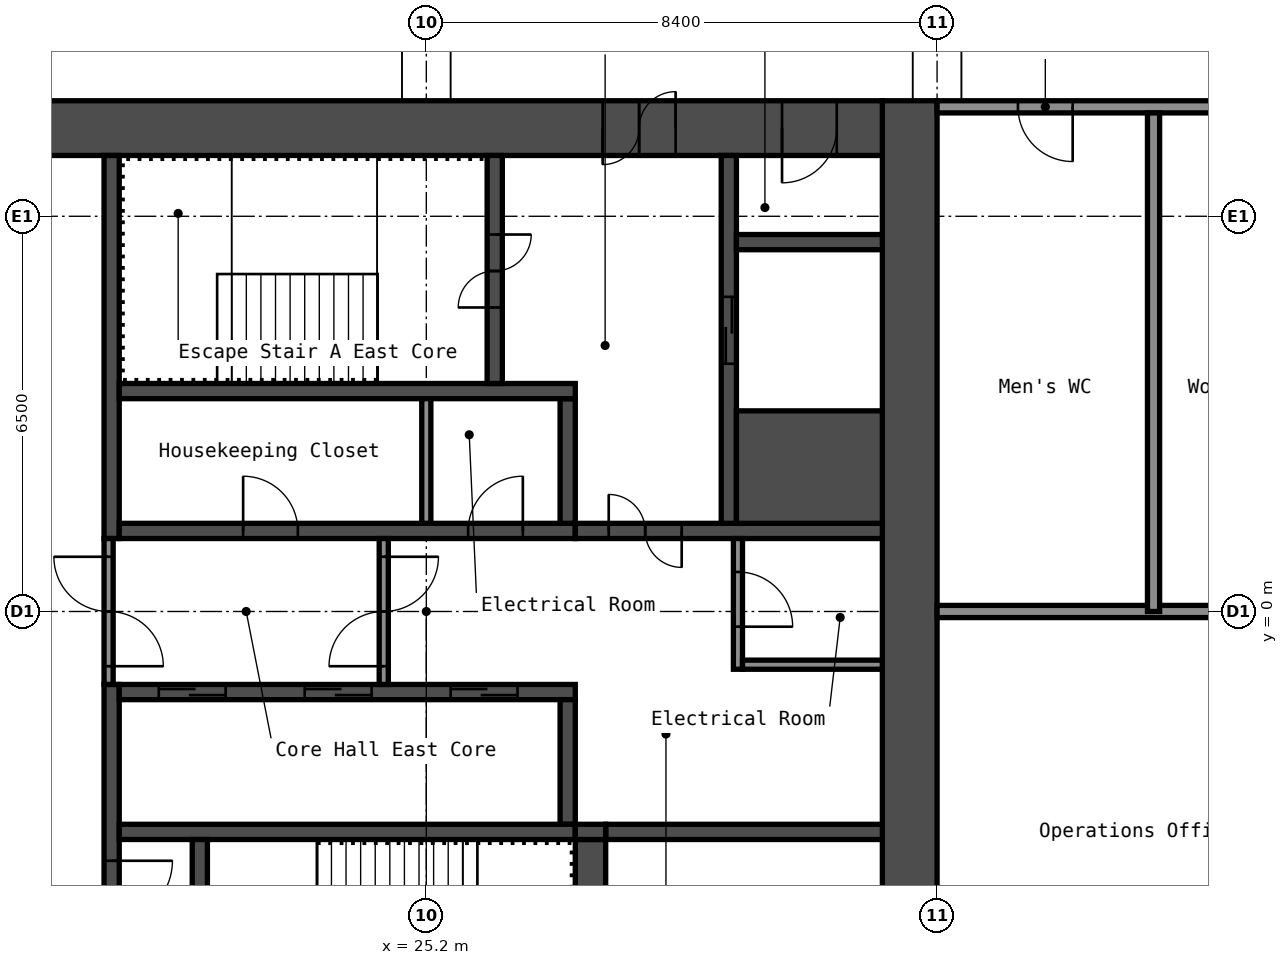
"""IFC4 building model, lengths in metres.
Left out: names, types, materials, properties, quantities, classifications, styles, units other than length and angle.
Written with IfcOpenShell. Run it as: python <this file> out.ifc"""

import sys

from ifc_helpers import new_model, si_unit, direction, frame, frame_2d, origin, place, context, subcontext, project, spatial, rectangle, extrude, element, fill, save


model = new_model("IFC4")
c1 = context("Model", 3, precision=1e-05, world=origin(), true_north=direction((0.0, 1.0)))
c2 = subcontext(c1, "Body", "Model", "MODEL_VIEW")
j1 = project(units=[si_unit("LENGTHUNIT", "METRE"), si_unit("PLANEANGLEUNIT", "RADIAN")], contexts=[c1])
p1 = place(None, origin())
s1 = spatial("IfcSite", under=j1, at=p1, CompositionType="ELEMENT")
p2 = place(p1, origin())
s2 = spatial("IfcBuilding", under=s1, at=p2, CompositionType="ELEMENT")
p3 = place(p2, frame((0.0, 0.0, 175.8)))
s3 = spatial("IfcBuildingStorey", under=s2, at=p3, CompositionType="ELEMENT", Elevation=175.8)
p4 = place(p3, frame((33.15, -8.4, 0.0), z_axis=(0.0, 0.0, 1.0), x_axis=(0.0, 1.0, 0.0)))
e1 = element("IfcWall", 1, at=p4, inside=s3, PredefinedType="SHEAR", context=c2, shape_type="SweptSolid", body=[
    extrude(rectangle(XDim=16.8, YDim=0.9, at=frame_2d((8.4, 0.0))), origin(), (0.0, 0.0, 1.0), 4.1),
])
p5 = place(p3, frame((17.7, 7.95, 0.0), z_axis=(0.0, 0.0, 1.0), x_axis=(1.0, 0.0, 0.0)))
e2 = element("IfcWall", 2, at=p5, inside=s3, PredefinedType="SHEAR", context=c2, shape_type="SweptSolid", body=[
    extrude(rectangle(XDim=15.0, YDim=0.9, at=frame_2d((7.5, 0.0))), origin(), (0.0, 0.0, 1.0), 4.1),
])
p6 = place(p5, frame((10.4, 0.0, 0.0)))
e3 = element("IfcOpeningElement", 3, at=p6, cuts=e2, PredefinedType="OPENING", context=c2, shape_type="SweptSolid", body=[
    extrude(rectangle(XDim=1.2, YDim=2.1, at=frame_2d((0.6, 1.05))), frame((0.0, 0.46, 0.0), z_axis=(0.0, -1.0, 0.0), x_axis=(1.0, 0.0, 0.0)), (0.0, 0.0, 1.0), 0.92),
])
p7 = place(p5, frame((13.35, 0.0, 0.0)))
e4 = element("IfcOpeningElement", 4, at=p7, cuts=e2, PredefinedType="OPENING", context=c2, shape_type="SweptSolid", body=[
    extrude(rectangle(XDim=0.9, YDim=2.1, at=frame_2d((0.45, 1.05))), frame((0.0, 0.46, 0.0), z_axis=(0.0, -1.0, 0.0), x_axis=(1.0, 0.0, 0.0)), (0.0, 0.0, 1.0), 0.92),
])
p8 = place(p3, frame((20.025, 1.2, 0.0), z_axis=(0.0, 0.0, 1.0), x_axis=(0.0, 1.0, 0.0)))
e5 = element("IfcWall", 5, at=p8, inside=s3, PredefinedType="SHEAR", context=c2, shape_type="SweptSolid", body=[
    extrude(rectangle(XDim=6.3, YDim=0.25, at=frame_2d((3.15, 0.0))), origin(), (0.0, 0.0, 1.0), 4.1),
])
p9 = place(p3, frame((20.025, -7.5, 0.0), z_axis=(0.0, 0.0, 1.0), x_axis=(0.0, 1.0, 0.0)))
e6 = element("IfcWall", 6, at=p9, inside=s3, PredefinedType="SHEAR", context=c2, shape_type="SweptSolid", body=[
    extrude(rectangle(XDim=6.3, YDim=0.25, at=frame_2d((3.15, 0.0))), origin(), (0.0, 0.0, 1.0), 4.1),
])
p10 = place(p9, frame((2.4, 0.0, 0.0)))
e7 = element("IfcOpeningElement", 7, at=p10, cuts=e6, PredefinedType="OPENING", context=c2, shape_type="SweptSolid", body=[
    extrude(rectangle(XDim=1.0, YDim=2.1, at=frame_2d((0.5, 1.05))), frame((0.0, 0.135, 0.0), z_axis=(0.0, -1.0, 0.0), x_axis=(1.0, 0.0, 0.0)), (0.0, 0.0, 1.0), 0.27),
])
p11 = place(p3, frame((20.15, 1.325, 0.0), z_axis=(0.0, 0.0, 1.0), x_axis=(1.0, 0.0, 0.0)))
e8 = element("IfcWall", 8, at=p11, inside=s3, PredefinedType="SHEAR", context=c2, shape_type="SweptSolid", body=[
    extrude(rectangle(XDim=7.5, YDim=0.25, at=frame_2d((3.75, 0.0))), origin(), (0.0, 0.0, 1.0), 4.1),
])
p12 = place(p11, frame((2.038, 0.0, 0.0)))
e9 = element("IfcOpeningElement", 9, at=p12, cuts=e8, PredefinedType="OPENING", context=c2, shape_type="SweptSolid", body=[
    extrude(rectangle(XDim=0.9, YDim=2.1, at=frame_2d((0.45, 1.05))), frame((0.0, 0.135, 0.0), z_axis=(0.0, -1.0, 0.0), x_axis=(1.0, 0.0, 0.0)), (0.0, 0.0, 1.0), 0.27),
])
p13 = place(p11, frame((5.738, 0.0, 0.0)))
e10 = element("IfcOpeningElement", 10, at=p13, cuts=e8, PredefinedType="OPENING", context=c2, shape_type="SweptSolid", body=[
    extrude(rectangle(XDim=0.9, YDim=2.1, at=frame_2d((0.45, 1.05))), frame((0.0, 0.135, 0.0), z_axis=(0.0, -1.0, 0.0), x_axis=(1.0, 0.0, 0.0)), (0.0, 0.0, 1.0), 0.27),
])
p14 = place(p3, frame((27.525, 1.45, 0.0), z_axis=(0.0, 0.0, 1.0), x_axis=(0.0, 1.0, 0.0)))
e11 = element("IfcWall", 11, at=p14, inside=s3, PredefinedType="SHEAR", context=c2, shape_type="SweptSolid", body=[
    extrude(rectangle(XDim=2.05, YDim=0.25, at=frame_2d((1.025, 0.0))), origin(), (0.0, 0.0, 1.0), 4.1),
])
p15 = place(p3, frame((20.15, 3.625, 0.0), z_axis=(0.0, 0.0, 1.0), x_axis=(1.0, 0.0, 0.0)))
e12 = element("IfcWall", 12, at=p15, inside=s3, PredefinedType="SHEAR", context=c2, shape_type="SweptSolid", body=[
    extrude(rectangle(XDim=7.5, YDim=0.25, at=frame_2d((3.75, 0.0))), origin(), (0.0, 0.0, 1.0), 4.1),
])
p16 = place(p3, frame((26.325, 3.75, 0.0), z_axis=(0.0, 0.0, 1.0), x_axis=(0.0, 1.0, 0.0)))
e13 = element("IfcWall", 13, at=p16, inside=s3, PredefinedType="SHEAR", context=c2, shape_type="SweptSolid", body=[
    extrude(rectangle(XDim=3.75, YDim=0.25, at=frame_2d((1.875, 0.0))), origin(), (0.0, 0.0, 1.0), 4.1),
])
p17 = place(p16, frame((1.25, 0.0, 0.0)))
e14 = element("IfcOpeningElement", 14, at=p17, cuts=e13, PredefinedType="OPENING", context=c2, shape_type="SweptSolid", body=[
    extrude(rectangle(XDim=1.2, YDim=2.1, at=frame_2d((0.6, 1.05))), frame((0.0, 0.135, 0.0), z_axis=(0.0, -1.0, 0.0), x_axis=(1.0, 0.0, 0.0)), (0.0, 0.0, 1.0), 0.27),
])
p18 = place(p3, frame((27.65, 1.325, 0.0), z_axis=(0.0, 0.0, 1.0), x_axis=(1.0, 0.0, 0.0)))
e15 = element("IfcWall", 15, at=p18, inside=s3, PredefinedType="SHEAR", context=c2, shape_type="SweptSolid", body=[
    extrude(rectangle(XDim=5.05, YDim=0.25, at=frame_2d((2.525, 0.0))), origin(), (0.0, 0.0, 1.0), 4.1),
])
p19 = place(p18, frame((0.55, 0.0, 0.0)))
e16 = element("IfcOpeningElement", 16, at=p19, cuts=e15, PredefinedType="OPENING", context=c2, shape_type="SweptSolid", body=[
    extrude(rectangle(XDim=1.2, YDim=2.1, at=frame_2d((0.6, 1.05))), frame((0.0, 0.135, 0.0), z_axis=(0.0, -1.0, 0.0), x_axis=(1.0, 0.0, 0.0)), (0.0, 0.0, 1.0), 0.27),
])
p20 = place(p3, frame((30.175, 1.45, 0.0), z_axis=(0.0, 0.0, 1.0), x_axis=(0.0, 1.0, 0.0)))
e17 = element("IfcWall", 17, at=p20, inside=s3, PredefinedType="SHEAR", context=c2, shape_type="SweptSolid", body=[
    extrude(rectangle(XDim=6.05, YDim=0.25, at=frame_2d((3.025, 0.0))), origin(), (0.0, 0.0, 1.0), 4.1),
])
p21 = place(p20, frame((2.625, 0.0, 0.0)))
e18 = element("IfcOpeningElement", 18, at=p21, cuts=e17, PredefinedType="OPENING", context=c2, shape_type="SweptSolid", body=[
    extrude(rectangle(XDim=1.1, YDim=2.1, at=frame_2d((0.55, 1.05))), frame((0.0, 0.135, 0.0), z_axis=(0.0, -1.0, 0.0), x_axis=(1.0, 0.0, 0.0)), (0.0, 0.0, 1.0), 0.27),
])
p22 = place(p3, frame((30.3, 2.375, 0.0), z_axis=(0.0, 0.0, 1.0), x_axis=(1.0, 0.0, 0.0)))
e19 = element("IfcWall", 19, at=p22, inside=s3, PredefinedType="SHEAR", context=c2, shape_type="SweptSolid", body=[
    extrude(rectangle(XDim=2.4, YDim=1.85, at=frame_2d((1.2, 0.0))), origin(), (0.0, 0.0, 1.0), 4.1),
])
p23 = place(p3, frame((30.3, 6.075, 0.0), z_axis=(0.0, 0.0, 1.0), x_axis=(1.0, 0.0, 0.0)))
e20 = element("IfcWall", 20, at=p23, inside=s3, PredefinedType="SHEAR", context=c2, shape_type="SweptSolid", body=[
    extrude(rectangle(XDim=2.4, YDim=0.25, at=frame_2d((1.2, 0.0))), origin(), (0.0, 0.0, 1.0), 4.1),
])
p24 = place(p3, frame((20.15, -1.325, 0.0), z_axis=(0.0, 0.0, 1.0), x_axis=(1.0, 0.0, 0.0)))
e21 = element("IfcWall", 21, at=p24, inside=s3, PredefinedType="SHEAR", context=c2, shape_type="SweptSolid", body=[
    extrude(rectangle(XDim=7.5, YDim=0.25, at=frame_2d((3.75, 0.0))), origin(), (0.0, 0.0, 1.0), 4.1),
])
p25 = place(p24, frame((0.65, 0.0, 0.0)))
e22 = element("IfcOpeningElement", 22, at=p25, cuts=e21, PredefinedType="OPENING", context=c2, shape_type="SweptSolid", body=[
    extrude(rectangle(XDim=1.1, YDim=2.1, at=frame_2d((0.55, 1.05))), frame((0.0, 0.135, 0.0), z_axis=(0.0, -1.0, 0.0), x_axis=(1.0, 0.0, 0.0)), (0.0, 0.0, 1.0), 0.27),
])
p26 = place(p24, frame((3.05, 0.0, 0.0)))
e23 = element("IfcOpeningElement", 23, at=p26, cuts=e21, PredefinedType="OPENING", context=c2, shape_type="SweptSolid", body=[
    extrude(rectangle(XDim=1.1, YDim=2.1, at=frame_2d((0.55, 1.05))), frame((0.0, 0.135, 0.0), z_axis=(0.0, -1.0, 0.0), x_axis=(1.0, 0.0, 0.0)), (0.0, 0.0, 1.0), 0.27),
])
p27 = place(p24, frame((5.45, 0.0, 0.0)))
e24 = element("IfcOpeningElement", 24, at=p27, cuts=e21, PredefinedType="OPENING", context=c2, shape_type="SweptSolid", body=[
    extrude(rectangle(XDim=1.1, YDim=2.1, at=frame_2d((0.55, 1.05))), frame((0.0, 0.135, 0.0), z_axis=(0.0, -1.0, 0.0), x_axis=(1.0, 0.0, 0.0)), (0.0, 0.0, 1.0), 0.27),
])
p28 = place(p3, frame((27.525, -3.5, 0.0), z_axis=(0.0, 0.0, 1.0), x_axis=(0.0, 1.0, 0.0)))
e25 = element("IfcWall", 25, at=p28, inside=s3, PredefinedType="SHEAR", context=c2, shape_type="SweptSolid", body=[
    extrude(rectangle(XDim=2.05, YDim=0.25, at=frame_2d((1.025, 0.0))), origin(), (0.0, 0.0, 1.0), 4.1),
])
p29 = place(p3, frame((20.15, -3.625, 0.0), z_axis=(0.0, 0.0, 1.0), x_axis=(1.0, 0.0, 0.0)))
e26 = element("IfcWall", 26, at=p29, inside=s3, PredefinedType="SHEAR", context=c2, shape_type="SweptSolid", body=[
    extrude(rectangle(XDim=7.5, YDim=0.25, at=frame_2d((3.75, 0.0))), origin(), (0.0, 0.0, 1.0), 4.1),
])
p30 = place(p3, frame((21.475, -7.5, 0.0), z_axis=(0.0, 0.0, 1.0), x_axis=(0.0, 1.0, 0.0)))
e27 = element("IfcWall", 27, at=p30, inside=s3, PredefinedType="SHEAR", context=c2, shape_type="SweptSolid", body=[
    extrude(rectangle(XDim=3.75, YDim=0.25, at=frame_2d((1.875, 0.0))), origin(), (0.0, 0.0, 1.0), 4.1),
])
p31 = place(p30, frame((1.3, 0.0, 0.0)))
e28 = element("IfcOpeningElement", 28, at=p31, cuts=e27, PredefinedType="OPENING", context=c2, shape_type="SweptSolid", body=[
    extrude(rectangle(XDim=1.2, YDim=2.1, at=frame_2d((0.6, 1.05))), frame((0.0, 0.135, 0.0), z_axis=(0.0, -1.0, 0.0), x_axis=(1.0, 0.0, 0.0)), (0.0, 0.0, 1.0), 0.27),
])
p32 = place(p3, frame((27.9, -7.5, 0.0), z_axis=(0.0, 0.0, 1.0), x_axis=(0.0, 1.0, 0.0)))
e29 = element("IfcWall", 29, at=p32, inside=s3, PredefinedType="SHEAR", context=c2, shape_type="SweptSolid", body=[
    extrude(rectangle(XDim=3.75, YDim=0.5, at=frame_2d((1.875, 0.0))), origin(), (0.0, 0.0, 1.0), 4.1),
])
p33 = place(p3, frame((28.15, -3.625, 0.0), z_axis=(0.0, 0.0, 1.0), x_axis=(1.0, 0.0, 0.0)))
e30 = element("IfcWall", 30, at=p33, inside=s3, PredefinedType="SHEAR", context=c2, shape_type="SweptSolid", body=[
    extrude(rectangle(XDim=4.55, YDim=0.25, at=frame_2d((2.275, 0.0))), origin(), (0.0, 0.0, 1.0), 4.1),
])
p34 = place(p3, frame((27.65, -3.625, 0.0), z_axis=(0.0, 0.0, 1.0), x_axis=(1.0, 0.0, 0.0)))
e31 = element("IfcWall", 31, at=p34, inside=s3, PredefinedType="SHEAR", context=c2, shape_type="SweptSolid", body=[
    extrude(rectangle(XDim=0.5, YDim=0.25, at=frame_2d((0.25, 0.0))), origin(), (0.0, 0.0, 1.0), 4.1),
])
p35 = place(p3, frame((19.975, -1.2, 0.0), z_axis=(0.0, 0.0, 1.0), x_axis=(0.0, 1.0, 0.0)))
e32 = element("IfcWall", 32, at=p35, inside=s3, PredefinedType="PARTITIONING", context=c2, shape_type="SweptSolid", body=[
    extrude(rectangle(XDim=2.4, YDim=0.15, at=frame_2d((1.2, 0.0))), origin(), (0.0, 0.0, 1.0), 4.1),
])
p36 = place(p35, frame((0.3, 0.0, 0.0)))
e33 = element("IfcOpeningElement", 33, at=p36, cuts=e32, PredefinedType="OPENING", context=c2, shape_type="SweptSolid", body=[
    extrude(rectangle(XDim=1.8, YDim=2.1, at=frame_2d((0.9, 1.05))), frame((0.0, 0.085, 0.0), z_axis=(0.0, -1.0, 0.0), x_axis=(1.0, 0.0, 0.0)), (0.0, 0.0, 1.0), 0.17),
])
p37 = place(p3, frame((24.5, -1.2, 0.0), z_axis=(0.0, 0.0, 1.0), x_axis=(0.0, 1.0, 0.0)))
e34 = element("IfcWall", 34, at=p37, inside=s3, PredefinedType="PARTITIONING", context=c2, shape_type="SweptSolid", body=[
    extrude(rectangle(XDim=2.4, YDim=0.15, at=frame_2d((1.2, 0.0))), origin(), (0.0, 0.0, 1.0), 4.1),
])
p38 = place(p37, frame((0.3, 0.0, 0.0)))
e35 = element("IfcOpeningElement", 35, at=p38, cuts=e34, PredefinedType="OPENING", context=c2, shape_type="SweptSolid", body=[
    extrude(rectangle(XDim=1.8, YDim=2.1, at=frame_2d((0.9, 1.05))), frame((0.0, 0.085, 0.0), z_axis=(0.0, -1.0, 0.0), x_axis=(1.0, 0.0, 0.0)), (0.0, 0.0, 1.0), 0.17),
])
p39 = place(p3, frame((30.325, -0.95, 0.0), z_axis=(0.0, 0.0, 1.0), x_axis=(0.0, 1.0, 0.0)))
e36 = element("IfcWall", 36, at=p39, inside=s3, PredefinedType="PARTITIONING", context=c2, shape_type="SweptSolid", body=[
    extrude(rectangle(XDim=2.15, YDim=0.15, at=frame_2d((1.075, 0.0))), origin(), (0.0, 0.0, 1.0), 4.1),
])
p40 = place(p39, frame((0.7, 0.0, 0.0)))
e37 = element("IfcOpeningElement", 37, at=p40, cuts=e36, PredefinedType="OPENING", context=c2, shape_type="SweptSolid", body=[
    extrude(rectangle(XDim=0.9, YDim=2.1, at=frame_2d((0.45, 1.05))), frame((0.0, 0.085, 0.0), z_axis=(0.0, -1.0, 0.0), x_axis=(1.0, 0.0, 0.0)), (0.0, 0.0, 1.0), 0.17),
])
p41 = place(p3, frame((30.4, -0.875, 0.0), z_axis=(0.0, 0.0, 1.0), x_axis=(1.0, 0.0, 0.0)))
e38 = element("IfcWall", 38, at=p41, inside=s3, PredefinedType="PARTITIONING", context=c2, shape_type="SweptSolid", body=[
    extrude(rectangle(XDim=2.3, YDim=0.15, at=frame_2d((1.15, 0.0))), origin(), (0.0, 0.0, 1.0), 4.1),
])
p42 = place(p3, frame((25.2, 1.45, 0.0), z_axis=(0.0, 0.0, 1.0), x_axis=(0.0, 1.0, 0.0)))
e39 = element("IfcWall", 39, at=p42, inside=s3, PredefinedType="PARTITIONING", context=c2, shape_type="SweptSolid", body=[
    extrude(rectangle(XDim=2.05, YDim=0.15, at=frame_2d((1.025, 0.0))), origin(), (0.0, 0.0, 1.0), 4.1),
])
p43 = place(p3, frame((33.6, 0.0, 0.0), z_axis=(0.0, 0.0, 1.0), x_axis=(1.0, 0.0, 0.0)))
e40 = element("IfcWall", 40, at=p43, inside=s3, PredefinedType="PARTITIONING", context=c2, shape_type="SweptSolid", body=[
    extrude(rectangle(XDim=6.5, YDim=0.2, at=frame_2d((3.25, 0.0))), origin(), (0.0, 0.0, 1.0), 4.1),
])
p44 = place(p3, frame((33.6, 8.3, 0.0), z_axis=(0.0, 0.0, 1.0), x_axis=(1.0, 0.0, 0.0)))
e41 = element("IfcWall", 41, at=p44, inside=s3, PredefinedType="PARTITIONING", context=c2, shape_type="SweptSolid", body=[
    extrude(rectangle(XDim=6.6, YDim=0.2, at=frame_2d((3.3, 0.0))), origin(), (0.0, 0.0, 1.0), 4.1),
])
p45 = place(p44, frame((1.33, 0.0, 0.0)))
e42 = element("IfcOpeningElement", 42, at=p45, cuts=e41, PredefinedType="OPENING", context=c2, shape_type="SweptSolid", body=[
    extrude(rectangle(XDim=0.9, YDim=2.1, at=frame_2d((0.45, 1.05))), frame((0.0, 0.11, 0.0), z_axis=(0.0, -1.0, 0.0), x_axis=(1.0, 0.0, 0.0)), (0.0, 0.0, 1.0), 0.22),
])
p46 = place(p44, frame((4.63, 0.0, 0.0)))
e43 = element("IfcOpeningElement", 43, at=p46, cuts=e41, PredefinedType="OPENING", context=c2, shape_type="SweptSolid", body=[
    extrude(rectangle(XDim=0.9, YDim=2.1, at=frame_2d((0.45, 1.05))), frame((0.0, 0.11, 0.0), z_axis=(0.0, -1.0, 0.0), x_axis=(1.0, 0.0, 0.0)), (0.0, 0.0, 1.0), 0.22),
])
p47 = place(p3, frame((37.16, 0.0, 0.0), z_axis=(0.0, 0.0, 1.0), x_axis=(0.0, 1.0, 0.0)))
e44 = element("IfcWall", 44, at=p47, inside=s3, PredefinedType="PARTITIONING", context=c2, shape_type="SweptSolid", body=[
    extrude(rectangle(XDim=8.2, YDim=0.2, at=frame_2d((4.1, 0.0))), origin(), (0.0, 0.0, 1.0), 4.1),
])
p48 = place(p6, origin())
e45 = element("IfcDoor", 45, at=p48, inside=s3, OperationType="DOUBLE_DOOR_SINGLE_SWING", PredefinedType="DOOR", context=c2, shape_type="SweptSolid", body=[
    extrude(rectangle(XDim=1.2, YDim=2.1, at=frame_2d((0.6, 1.05))), frame((0.0, 0.025, 0.0), z_axis=(0.0, -1.0, 0.0), x_axis=(1.0, 0.0, 0.0)), (0.0, 0.0, 1.0), 0.05),
])
fill(e3, e45)
p49 = place(p7, origin())
e46 = element("IfcDoor", 46, at=p49, inside=s3, OperationType="SINGLE_SWING_LEFT", PredefinedType="DOOR", context=c2, shape_type="SweptSolid", body=[
    extrude(rectangle(XDim=0.9, YDim=2.1, at=frame_2d((0.45, 1.05))), frame((0.0, 0.025, 0.0), z_axis=(0.0, -1.0, 0.0), x_axis=(1.0, 0.0, 0.0)), (0.0, 0.0, 1.0), 0.05),
])
fill(e4, e46)
p50 = place(p17, origin())
e47 = element("IfcDoor", 47, at=p50, inside=s3, OperationType="DOUBLE_DOOR_SINGLE_SWING", PredefinedType="DOOR", context=c2, shape_type="SweptSolid", body=[
    extrude(rectangle(XDim=1.2, YDim=2.1, at=frame_2d((0.6, 1.05))), frame((0.0, 0.025, 0.0), z_axis=(0.0, -1.0, 0.0), x_axis=(1.0, 0.0, 0.0)), (0.0, 0.0, 1.0), 0.05),
])
fill(e14, e47)
p51 = place(p10, origin())
e48 = element("IfcDoor", 48, at=p51, inside=s3, OperationType="SINGLE_SWING_RIGHT", PredefinedType="DOOR", context=c2, shape_type="SweptSolid", body=[
    extrude(rectangle(XDim=1.0, YDim=2.1, at=frame_2d((0.5, 1.05))), frame((0.0, 0.025, 0.0), z_axis=(0.0, -1.0, 0.0), x_axis=(1.0, 0.0, 0.0)), (0.0, 0.0, 1.0), 0.05),
])
fill(e7, e48)
p52 = place(p19, origin())
e49 = element("IfcDoor", 49, at=p52, inside=s3, OperationType="DOUBLE_DOOR_SINGLE_SWING", PredefinedType="DOOR", context=c2, shape_type="SweptSolid", body=[
    extrude(rectangle(XDim=1.2, YDim=2.1, at=frame_2d((0.6, 1.05))), frame((0.0, 0.025, 0.0), z_axis=(0.0, -1.0, 0.0), x_axis=(1.0, 0.0, 0.0)), (0.0, 0.0, 1.0), 0.05),
])
fill(e16, e49)
p53 = place(p36, origin())
e50 = element("IfcDoor", 50, at=p53, inside=s3, OperationType="DOUBLE_DOOR_SINGLE_SWING", PredefinedType="DOOR", context=c2, shape_type="SweptSolid", body=[
    extrude(rectangle(XDim=1.8, YDim=2.1, at=frame_2d((0.9, 1.05))), frame((0.0, 0.025, 0.0), z_axis=(0.0, -1.0, 0.0), x_axis=(1.0, 0.0, 0.0)), (0.0, 0.0, 1.0), 0.05),
])
fill(e33, e50)
p54 = place(p38, origin())
e51 = element("IfcDoor", 51, at=p54, inside=s3, OperationType="DOUBLE_DOOR_SINGLE_SWING", PredefinedType="DOOR", context=c2, shape_type="SweptSolid", body=[
    extrude(rectangle(XDim=1.8, YDim=2.1, at=frame_2d((0.9, 1.05))), frame((0.0, 0.025, 0.0), z_axis=(0.0, -1.0, 0.0), x_axis=(1.0, 0.0, 0.0)), (0.0, 0.0, 1.0), 0.05),
])
fill(e35, e51)
p55 = place(p40, origin())
e52 = element("IfcDoor", 52, at=p55, inside=s3, OperationType="SINGLE_SWING_LEFT", PredefinedType="DOOR", context=c2, shape_type="SweptSolid", body=[
    extrude(rectangle(XDim=0.9, YDim=2.1, at=frame_2d((0.45, 1.05))), frame((0.0, 0.025, 0.0), z_axis=(0.0, -1.0, 0.0), x_axis=(1.0, 0.0, 0.0)), (0.0, 0.0, 1.0), 0.05),
])
fill(e37, e52)
p56 = place(p12, origin())
e53 = element("IfcDoor", 53, at=p56, inside=s3, OperationType="SINGLE_SWING_RIGHT", PredefinedType="DOOR", context=c2, shape_type="SweptSolid", body=[
    extrude(rectangle(XDim=0.9, YDim=2.1, at=frame_2d((0.45, 1.05))), frame((0.0, 0.025, 0.0), z_axis=(0.0, -1.0, 0.0), x_axis=(1.0, 0.0, 0.0)), (0.0, 0.0, 1.0), 0.05),
])
fill(e9, e53)
p57 = place(p13, origin())
e54 = element("IfcDoor", 54, at=p57, inside=s3, OperationType="SINGLE_SWING_LEFT", PredefinedType="DOOR", context=c2, shape_type="SweptSolid", body=[
    extrude(rectangle(XDim=0.9, YDim=2.1, at=frame_2d((0.45, 1.05))), frame((0.0, 0.025, 0.0), z_axis=(0.0, -1.0, 0.0), x_axis=(1.0, 0.0, 0.0)), (0.0, 0.0, 1.0), 0.05),
])
fill(e10, e54)
p58 = place(p25, origin())
e55 = element("IfcDoor", 55, at=p58, inside=s3, OperationType="DOUBLE_DOOR_SLIDING", PredefinedType="DOOR", context=c2, shape_type="SweptSolid", body=[
    extrude(rectangle(XDim=1.1, YDim=2.1, at=frame_2d((0.55, 1.05))), frame((0.0, 0.025, 0.0), z_axis=(0.0, -1.0, 0.0), x_axis=(1.0, 0.0, 0.0)), (0.0, 0.0, 1.0), 0.05),
])
fill(e22, e55)
p59 = place(p26, origin())
e56 = element("IfcDoor", 56, at=p59, inside=s3, OperationType="DOUBLE_DOOR_SLIDING", PredefinedType="DOOR", context=c2, shape_type="SweptSolid", body=[
    extrude(rectangle(XDim=1.1, YDim=2.1, at=frame_2d((0.55, 1.05))), frame((0.0, 0.025, 0.0), z_axis=(0.0, -1.0, 0.0), x_axis=(1.0, 0.0, 0.0)), (0.0, 0.0, 1.0), 0.05),
])
fill(e23, e56)
p60 = place(p27, origin())
e57 = element("IfcDoor", 57, at=p60, inside=s3, OperationType="DOUBLE_DOOR_SLIDING", PredefinedType="DOOR", context=c2, shape_type="SweptSolid", body=[
    extrude(rectangle(XDim=1.1, YDim=2.1, at=frame_2d((0.55, 1.05))), frame((0.0, 0.025, 0.0), z_axis=(0.0, -1.0, 0.0), x_axis=(1.0, 0.0, 0.0)), (0.0, 0.0, 1.0), 0.05),
])
fill(e24, e57)
p61 = place(p21, origin())
e58 = element("IfcDoor", 58, at=p61, inside=s3, OperationType="DOUBLE_DOOR_SLIDING", PredefinedType="DOOR", context=c2, shape_type="SweptSolid", body=[
    extrude(rectangle(XDim=1.1, YDim=2.1, at=frame_2d((0.55, 1.05))), frame((0.0, 0.025, 0.0), z_axis=(0.0, -1.0, 0.0), x_axis=(1.0, 0.0, 0.0)), (0.0, 0.0, 1.0), 0.05),
])
fill(e18, e58)
p62 = place(p45, origin())
e59 = element("IfcDoor", 59, at=p62, inside=s3, OperationType="SINGLE_SWING_RIGHT", PredefinedType="DOOR", context=c2, shape_type="SweptSolid", body=[
    extrude(rectangle(XDim=0.9, YDim=2.1, at=frame_2d((0.45, 1.05))), frame((0.0, 0.025, 0.0), z_axis=(0.0, -1.0, 0.0), x_axis=(1.0, 0.0, 0.0)), (0.0, 0.0, 1.0), 0.05),
])
fill(e42, e59)
save(model, sys.argv[1])
